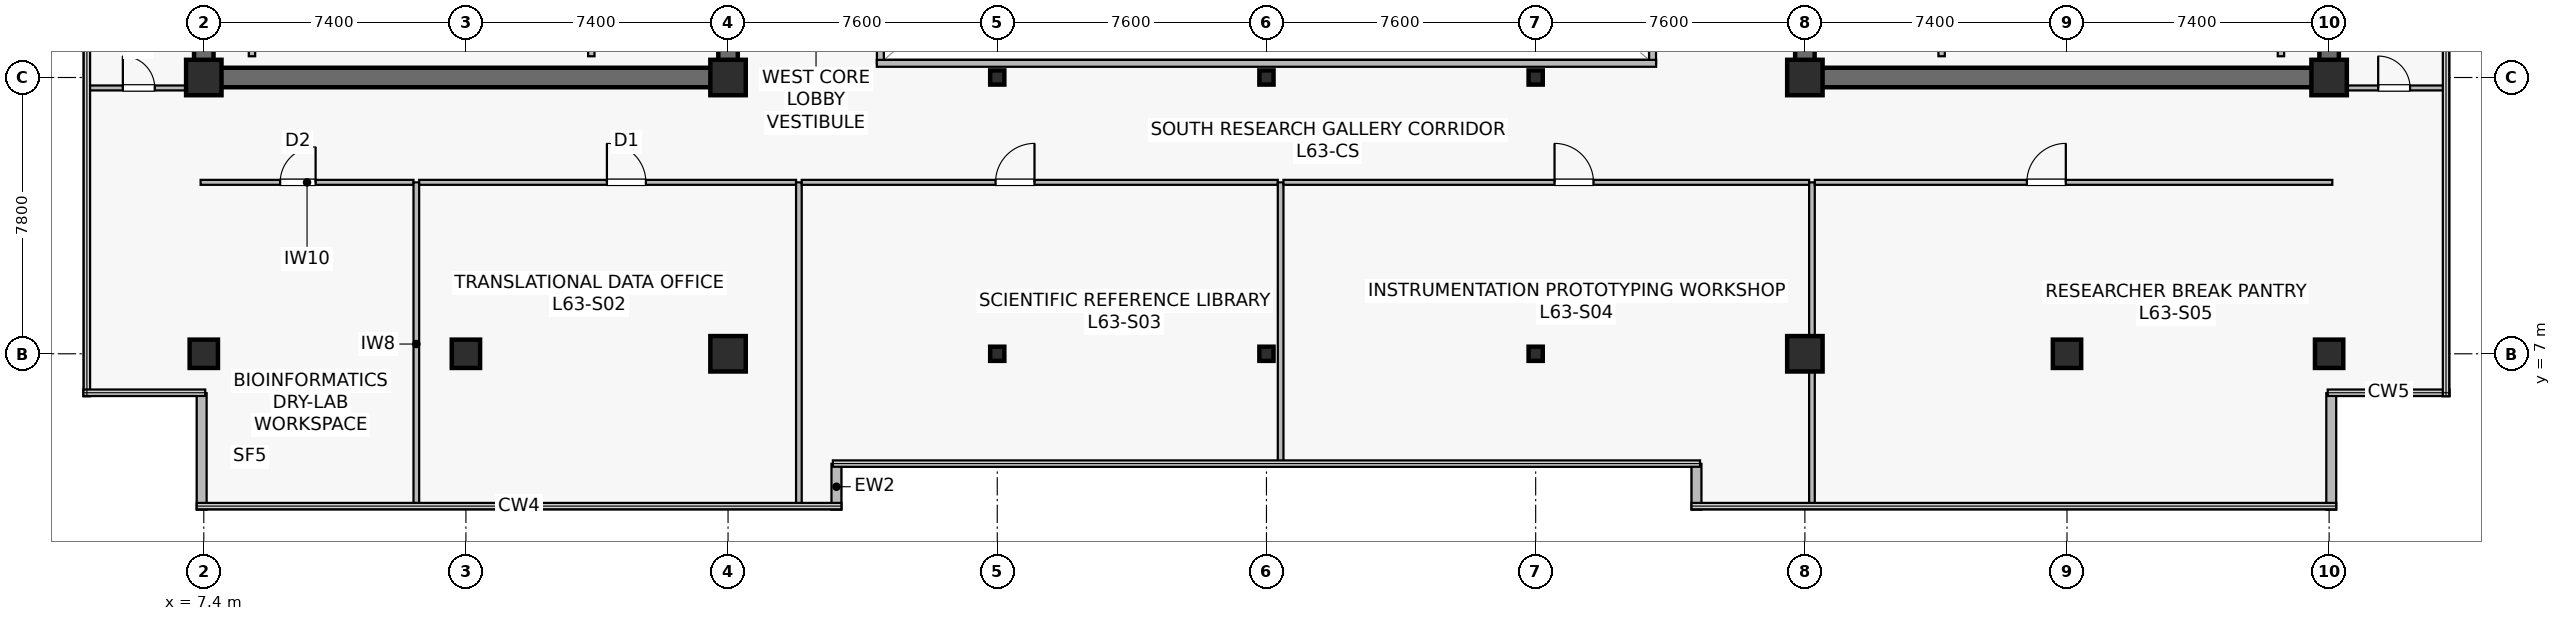
"""IFC4 building model, lengths in metres.
Left out: names, types, materials, properties, quantities, classifications, styles, units other than length and angle.
Written with IfcOpenShell. Run it as: python <this file> out.ifc"""

import sys

from ifc_helpers import new_model, si_unit, direction, frame, frame_2d, origin, origin_2d, place, context, subcontext, project, spatial, rectangle, hollow_rectangle, extrude, source, transform, mapped, element, fill, save


model = new_model("IFC4")
c1 = context("Model", 3, precision=1e-05, world=origin(), true_north=direction((0.0, 1.0)))
c2 = subcontext(c1, "Body", "Model", "MODEL_VIEW")
j1 = project(units=[si_unit("LENGTHUNIT", "METRE"), si_unit("PLANEANGLEUNIT", "RADIAN")], contexts=[c1])
p1 = place(None, origin())
s1 = spatial("IfcSite", under=j1, at=p1, CompositionType="ELEMENT")
p2 = place(p1, origin())
s2 = spatial("IfcBuilding", under=s1, at=p2, CompositionType="ELEMENT")
p3 = place(p2, frame((0.0, 0.0, 262.9)))
s3 = spatial("IfcBuildingStorey", under=s2, at=p3, CompositionType="ELEMENT", Elevation=262.9)
p4 = place(p3, frame((7.125, 14.8, 0.0), z_axis=(0.0, 0.0, 1.0), x_axis=(1.0, 0.0, 0.0)))
e1 = element("IfcWall", 1, at=p4, inside=s3, PredefinedType="SHEAR", context=c2, shape_type="SweptSolid", body=[
    extrude(rectangle(XDim=15.35, YDim=0.55, at=frame_2d((7.675, 0.0))), origin(), (0.0, 0.0, 1.0), 3.8),
])
p5 = place(p3, frame((7.4, 15.075, 0.0), z_axis=(0.0, 0.0, 1.0), x_axis=(0.0, 1.0, 0.0)))
e2 = element("IfcWall", 2, at=p5, inside=s3, PredefinedType="SHEAR", context=c2, shape_type="SweptSolid", body=[
    extrude(rectangle(XDim=18.45, YDim=0.55, at=frame_2d((9.225, 0.0))), origin(), (0.0, 0.0, 1.0), 3.8),
])
p6 = place(p3, frame((22.2, 15.075, 0.0), z_axis=(0.0, 0.0, 1.0), x_axis=(0.0, 1.0, 0.0)))
e3 = element("IfcWall", 3, at=p6, inside=s3, PredefinedType="SHEAR", context=c2, shape_type="SweptSolid", body=[
    extrude(rectangle(XDim=18.45, YDim=0.55, at=frame_2d((9.225, 0.0))), origin(), (0.0, 0.0, 1.0), 3.8),
])
p7 = place(p6, frame((3.475, 0.0, 0.0)))
e4 = element("IfcOpeningElement", 4, at=p7, cuts=e3, PredefinedType="OPENING", context=c2, shape_type="SweptSolid", body=[
    extrude(rectangle(XDim=1.42, YDim=2.2, at=frame_2d((0.71, 1.1))), frame((0.0, 0.285, 0.0), z_axis=(0.0, -1.0, 0.0), x_axis=(1.0, 0.0, 0.0)), (0.0, 0.0, 1.0), 0.57),
])
p8 = place(p3, frame((52.325, 14.8, 0.0), z_axis=(0.0, 0.0, 1.0), x_axis=(1.0, 0.0, 0.0)))
e5 = element("IfcWall", 5, at=p8, inside=s3, PredefinedType="SHEAR", context=c2, shape_type="SweptSolid", body=[
    extrude(rectangle(XDim=15.35, YDim=0.55, at=frame_2d((7.675, 0.0))), origin(), (0.0, 0.0, 1.0), 3.8),
])
p9 = place(p3, frame((52.6, 15.075, 0.0), z_axis=(0.0, 0.0, 1.0), x_axis=(0.0, 1.0, 0.0)))
e6 = element("IfcWall", 6, at=p9, inside=s3, PredefinedType="SHEAR", context=c2, shape_type="SweptSolid", body=[
    extrude(rectangle(XDim=18.45, YDim=0.55, at=frame_2d((9.225, 0.0))), origin(), (0.0, 0.0, 1.0), 3.8),
])
p10 = place(p9, frame((3.475, 0.0, 0.0)))
e7 = element("IfcOpeningElement", 7, at=p10, cuts=e6, PredefinedType="OPENING", context=c2, shape_type="SweptSolid", body=[
    extrude(rectangle(XDim=1.42, YDim=2.2, at=frame_2d((0.71, 1.1))), frame((0.0, 0.285, 0.0), z_axis=(0.0, -1.0, 0.0), x_axis=(1.0, 0.0, 0.0)), (0.0, 0.0, 1.0), 0.57),
])
p11 = place(p3, frame((67.4, 15.075, 0.0), z_axis=(0.0, 0.0, 1.0), x_axis=(0.0, 1.0, 0.0)))
e8 = element("IfcWall", 8, at=p11, inside=s3, PredefinedType="SHEAR", context=c2, shape_type="SweptSolid", body=[
    extrude(rectangle(XDim=18.45, YDim=0.55, at=frame_2d((9.225, 0.0))), origin(), (0.0, 0.0, 1.0), 3.8),
])
m1 = source(origin(), c2, "Body", "SweptSolid", [
    extrude(rectangle(XDim=0.8, YDim=0.8, at=origin_2d()), origin(), (0.0, 0.0, 1.0), 4.1),
])
p12 = place(p3, frame((14.8, 7.0, 0.0), z_axis=(0.0, 0.0, 1.0), x_axis=(1.0, 0.0, 0.0)))
e9 = element("IfcColumn", 9, at=p12, inside=s3, PredefinedType="COLUMN", context=c2, shape_type="MappedRepresentation", body=[
    mapped(m1, transform((0.0, 0.0, 0.0), scale=1.0)),
])
m2 = source(origin(), c2, "Body", "SweptSolid", [
    extrude(rectangle(XDim=1.0, YDim=1.0, at=origin_2d()), origin(), (0.0, 0.0, 1.0), 4.1),
])
for number, where, z_axis, x_axis in (
    (10, (22.2, 7.0, 0.0), (0.0, 0.0, 1.0), (1.0, 0.0, 0.0)),
    (11, (7.4, 14.8, 0.0), (0.0, 0.0, 1.0), (1.0, 0.0, 0.0)),
    (12, (22.2, 14.8, 0.0), (0.0, 0.0, 1.0), (1.0, 0.0, 0.0)),
    (13, (52.6, 7.0, 0.0), (0.0, 0.0, 1.0), (1.0, 0.0, 0.0)),
):
    element("IfcColumn", number, at=place(p3, frame(where, z_axis=z_axis, x_axis=x_axis)), inside=s3, PredefinedType="COLUMN", context=c2, shape_type="MappedRepresentation", body=[
        mapped(m2, transform((0.0, 0.0, 0.0), scale=1.0)),
    ])
p13 = place(p3, frame((60.0, 7.0, 0.0), z_axis=(0.0, 0.0, 1.0), x_axis=(1.0, 0.0, 0.0)))
e14 = element("IfcColumn", 14, at=p13, inside=s3, PredefinedType="COLUMN", context=c2, shape_type="MappedRepresentation", body=[
    mapped(m1, transform((0.0, 0.0, 0.0), scale=1.0)),
])
for number, where, z_axis, x_axis in (
    (15, (52.6, 14.8, 0.0), (0.0, 0.0, 1.0), (1.0, 0.0, 0.0)),
    (16, (67.4, 14.8, 0.0), (0.0, 0.0, 1.0), (1.0, 0.0, 0.0)),
):
    element("IfcColumn", number, at=place(p3, frame(where, z_axis=z_axis, x_axis=x_axis)), inside=s3, PredefinedType="COLUMN", context=c2, shape_type="MappedRepresentation", body=[
        mapped(m2, transform((0.0, 0.0, 0.0), scale=1.0)),
    ])
for number, where, z_axis, x_axis in (
    (17, (7.4, 7.0, 0.0), (0.0, 0.0, 1.0), (1.0, 0.0, 0.0)),
    (18, (67.4, 7.0, 0.0), (0.0, 0.0, 1.0), (1.0, 0.0, 0.0)),
):
    element("IfcColumn", number, at=place(p3, frame(where, z_axis=z_axis, x_axis=x_axis)), inside=s3, PredefinedType="COLUMN", context=c2, shape_type="MappedRepresentation", body=[
        mapped(m1, transform((0.0, 0.0, 0.0), scale=1.0)),
    ])
m3 = source(origin(), c2, "Body", "SweptSolid", [
    extrude(hollow_rectangle(XDim=0.4, YDim=0.4, WallThickness=0.019, at=origin_2d()), origin(), (0.0, 0.0, 1.0), 4.1),
])
for number, where, z_axis, x_axis in (
    (19, (29.8, 7.0, 0.0), (0.0, 0.0, 1.0), (1.0, 0.0, 0.0)),
    (20, (29.8, 14.8, 0.0), (0.0, 0.0, 1.0), (1.0, 0.0, 0.0)),
    (21, (37.4, 7.0, 0.0), (0.0, 0.0, 1.0), (1.0, 0.0, 0.0)),
    (22, (37.4, 14.8, 0.0), (0.0, 0.0, 1.0), (1.0, 0.0, 0.0)),
    (23, (45.0, 7.0, 0.0), (0.0, 0.0, 1.0), (1.0, 0.0, 0.0)),
    (24, (45.0, 14.8, 0.0), (0.0, 0.0, 1.0), (1.0, 0.0, 0.0)),
):
    element("IfcColumn", number, at=place(p3, frame(where, z_axis=z_axis, x_axis=x_axis)), inside=s3, PredefinedType="COLUMN", context=c2, shape_type="MappedRepresentation", body=[
        mapped(m3, transform((0.0, 0.0, 0.0), scale=1.0)),
    ])
for number, where, z_axis, x_axis in (
    (25, (25.26, 2.6, 0.0), (0.0, 0.0, 1.0), (0.0, 1.0, 0.0)),
    (26, (49.54, 3.893, 0.0), (0.0, 0.0, 1.0), (0.0, -1.0, 0.0)),
):
    element("IfcWall", number, at=place(p3, frame(where, z_axis=z_axis, x_axis=x_axis)), inside=s3, PredefinedType="STANDARD", context=c2, shape_type="SweptSolid", body=[
        extrude(rectangle(XDim=1.293, YDim=0.28, at=frame_2d((0.646, 0.0))), origin(), (0.0, 0.0, 1.0), 3.8),
    ])
for number, where, z_axis, x_axis in (
    (27, (67.46, 2.6, 0.0), (0.0, 0.0, 1.0), (0.0, 1.0, 0.0)),
    (28, (7.34, 5.888, 0.0), (0.0, 0.0, 1.0), (0.0, -1.0, 0.0)),
):
    element("IfcWall", number, at=place(p3, frame(where, z_axis=z_axis, x_axis=x_axis)), inside=s3, PredefinedType="STANDARD", context=c2, shape_type="SweptSolid", body=[
        extrude(rectangle(XDim=3.288, YDim=0.28, at=frame_2d((1.644, 0.0))), origin(), (0.0, 0.0, 1.0), 3.8),
    ])
for number, where, z_axis, x_axis in (
    (29, (18.34, 15.4, 0.0), (0.0, 0.0, 1.0), (0.0, 1.0, 0.0)),
    (30, (8.76, 15.4, 0.0), (0.0, 0.0, 1.0), (0.0, 1.0, 0.0)),
    (31, (56.46, 15.4, 0.0), (0.0, 0.0, 1.0), (0.0, 1.0, 0.0)),
    (32, (66.04, 15.4, 0.0), (0.0, 0.0, 1.0), (0.0, 1.0, 0.0)),
):
    element("IfcWall", number, at=place(p3, frame(where, z_axis=z_axis, x_axis=x_axis)), inside=s3, PredefinedType="SOLIDWALL", context=c2, shape_type="SweptSolid", body=[
        extrude(rectangle(XDim=2.4, YDim=0.18, at=frame_2d((1.2, 0.0))), origin(), (0.0, 0.0, 1.0), 3.8),
    ])
p14 = place(p3, frame((26.5, 15.2, 0.0), z_axis=(0.0, 0.0, 1.0), x_axis=(0.0, 1.0, 0.0)))
e33 = element("IfcWall", 33, at=p14, inside=s3, PredefinedType="SOLIDWALL", context=c2, shape_type="SweptSolid", body=[
    extrude(rectangle(XDim=18.2, YDim=0.195, at=frame_2d((9.1, 0.0))), origin(), (0.0, 0.0, 1.0), 3.8),
])
p15 = place(p14, frame((1.8, 0.0, 0.9)))
e34 = element("IfcOpeningElement", 34, at=p15, cuts=e33, PredefinedType="OPENING", context=c2, shape_type="SweptSolid", body=[
    extrude(rectangle(XDim=1.2, YDim=1.35, at=frame_2d((0.6, 0.675))), frame((0.0, 0.107, 0.0), z_axis=(0.0, -1.0, 0.0), x_axis=(1.0, 0.0, 0.0)), (0.0, 0.0, 1.0), 0.215),
])
p16 = place(p14, frame((13.2, 0.0, 0.9)))
e35 = element("IfcOpeningElement", 35, at=p16, cuts=e33, PredefinedType="OPENING", context=c2, shape_type="SweptSolid", body=[
    extrude(rectangle(XDim=1.2, YDim=1.35, at=frame_2d((0.6, 0.675))), frame((0.0, 0.107, 0.0), z_axis=(0.0, -1.0, 0.0), x_axis=(1.0, 0.0, 0.0)), (0.0, 0.0, 1.0), 0.215),
])
p17 = place(p3, frame((48.3, 15.2, 0.0), z_axis=(0.0, 0.0, 1.0), x_axis=(0.0, 1.0, 0.0)))
e36 = element("IfcWall", 36, at=p17, inside=s3, PredefinedType="SOLIDWALL", context=c2, shape_type="SweptSolid", body=[
    extrude(rectangle(XDim=18.2, YDim=0.195, at=frame_2d((9.1, 0.0))), origin(), (0.0, 0.0, 1.0), 3.8),
])
p18 = place(p17, frame((1.8, 0.0, 0.9)))
e37 = element("IfcOpeningElement", 37, at=p18, cuts=e36, PredefinedType="OPENING", context=c2, shape_type="SweptSolid", body=[
    extrude(rectangle(XDim=1.2, YDim=1.35, at=frame_2d((0.6, 0.675))), frame((0.0, 0.107, 0.0), z_axis=(0.0, -1.0, 0.0), x_axis=(1.0, 0.0, 0.0)), (0.0, 0.0, 1.0), 0.215),
])
p19 = place(p17, frame((13.2, 0.0, 0.9)))
e38 = element("IfcOpeningElement", 38, at=p19, cuts=e36, PredefinedType="OPENING", context=c2, shape_type="SweptSolid", body=[
    extrude(rectangle(XDim=1.2, YDim=1.35, at=frame_2d((0.6, 0.675))), frame((0.0, 0.107, 0.0), z_axis=(0.0, -1.0, 0.0), x_axis=(1.0, 0.0, 0.0)), (0.0, 0.0, 1.0), 0.215),
])
p20 = place(p3, frame((26.4, 15.2, 0.0), z_axis=(0.0, 0.0, 1.0), x_axis=(1.0, 0.0, 0.0)))
e39 = element("IfcWall", 39, at=p20, inside=s3, PredefinedType="SOLIDWALL", context=c2, shape_type="SweptSolid", body=[
    extrude(rectangle(XDim=22.0, YDim=0.195, at=frame_2d((11.0, 0.0))), origin(), (0.0, 0.0, 1.0), 3.8),
])
p21 = place(p3, frame((7.31, 11.84, 0.0), z_axis=(0.0, 0.0, 1.0), x_axis=(1.0, 0.0, 0.0)))
e40 = element("IfcWall", 40, at=p21, inside=s3, PredefinedType="PARTITIONING", context=c2, shape_type="SweptSolid", body=[
    extrude(rectangle(XDim=6.01, YDim=0.14, at=frame_2d((3.005, 0.0))), origin(), (0.0, 0.0, 1.0), 3.335),
])
p22 = place(p21, frame((2.246, 0.0, 0.0)))
e41 = element("IfcOpeningElement", 41, at=p22, cuts=e40, PredefinedType="OPENING", context=c2, shape_type="SweptSolid", body=[
    extrude(rectangle(XDim=1.0, YDim=2.15, at=frame_2d((0.5, 1.075))), frame((0.0, 0.08, 0.0), z_axis=(0.0, -1.0, 0.0), x_axis=(1.0, 0.0, 0.0)), (0.0, 0.0, 1.0), 0.16),
])
p23 = place(p3, frame((13.4, 2.71, 0.0), z_axis=(0.0, 0.0, 1.0), x_axis=(0.0, 1.0, 0.0)))
e42 = element("IfcWall", 42, at=p23, inside=s3, PredefinedType="PARTITIONING", context=c2, shape_type="SweptSolid", body=[
    extrude(rectangle(XDim=9.13, YDim=0.16, at=frame_2d((4.565, 0.0))), origin(), (0.0, 0.0, 1.0), 3.135),
])
p24 = place(p3, frame((13.48, 11.84, 0.0), z_axis=(0.0, 0.0, 1.0), x_axis=(1.0, 0.0, 0.0)))
e43 = element("IfcWall", 43, at=p24, inside=s3, PredefinedType="PARTITIONING", context=c2, shape_type="SweptSolid", body=[
    extrude(rectangle(XDim=10.64, YDim=0.14, at=frame_2d((5.32, 0.0))), origin(), (0.0, 0.0, 1.0), 3.197),
])
p25 = place(p24, frame((5.3, 0.0, 0.0)))
e44 = element("IfcOpeningElement", 44, at=p25, cuts=e43, PredefinedType="OPENING", context=c2, shape_type="SweptSolid", body=[
    extrude(rectangle(XDim=1.1, YDim=2.18, at=frame_2d((0.55, 1.09))), frame((0.0, 0.08, 0.0), z_axis=(0.0, -1.0, 0.0), x_axis=(1.0, 0.0, 0.0)), (0.0, 0.0, 1.0), 0.16),
])
p26 = place(p3, frame((24.2, 2.71, 0.0), z_axis=(0.0, 0.0, 1.0), x_axis=(0.0, 1.0, 0.0)))
e45 = element("IfcWall", 45, at=p26, inside=s3, PredefinedType="PARTITIONING", context=c2, shape_type="SweptSolid", body=[
    extrude(rectangle(XDim=9.13, YDim=0.16, at=frame_2d((4.565, 0.0))), origin(), (0.0, 0.0, 1.0), 3.135),
])
p27 = place(p3, frame((24.28, 11.84, 0.0), z_axis=(0.0, 0.0, 1.0), x_axis=(1.0, 0.0, 0.0)))
e46 = element("IfcWall", 46, at=p27, inside=s3, PredefinedType="PARTITIONING", context=c2, shape_type="SweptSolid", body=[
    extrude(rectangle(XDim=13.44, YDim=0.14, at=frame_2d((6.72, 0.0))), origin(), (0.0, 0.0, 1.0), 3.197),
])
p28 = place(p27, frame((5.472, 0.0, 0.0)))
e47 = element("IfcOpeningElement", 47, at=p28, cuts=e46, PredefinedType="OPENING", context=c2, shape_type="SweptSolid", body=[
    extrude(rectangle(XDim=1.1, YDim=2.18, at=frame_2d((0.55, 1.09))), frame((0.0, 0.08, 0.0), z_axis=(0.0, -1.0, 0.0), x_axis=(1.0, 0.0, 0.0)), (0.0, 0.0, 1.0), 0.16),
])
p29 = place(p3, frame((37.8, 3.91, 0.0), z_axis=(0.0, 0.0, 1.0), x_axis=(0.0, 1.0, 0.0)))
e48 = element("IfcWall", 48, at=p29, inside=s3, PredefinedType="PARTITIONING", context=c2, shape_type="SweptSolid", body=[
    extrude(rectangle(XDim=7.93, YDim=0.16, at=frame_2d((3.965, 0.0))), origin(), (0.0, 0.0, 1.0), 3.135),
])
p30 = place(p3, frame((37.88, 11.84, 0.0), z_axis=(0.0, 0.0, 1.0), x_axis=(1.0, 0.0, 0.0)))
e49 = element("IfcWall", 49, at=p30, inside=s3, PredefinedType="PARTITIONING", context=c2, shape_type="SweptSolid", body=[
    extrude(rectangle(XDim=14.84, YDim=0.14, at=frame_2d((7.42, 0.0))), origin(), (0.0, 0.0, 1.0), 3.197),
])
p31 = place(p30, frame((7.652, 0.0, 0.0)))
e50 = element("IfcOpeningElement", 50, at=p31, cuts=e49, PredefinedType="OPENING", context=c2, shape_type="SweptSolid", body=[
    extrude(rectangle(XDim=1.1, YDim=2.18, at=frame_2d((0.55, 1.09))), frame((0.0, 0.08, 0.0), z_axis=(0.0, -1.0, 0.0), x_axis=(1.0, 0.0, 0.0)), (0.0, 0.0, 1.0), 0.16),
])
p32 = place(p3, frame((52.8, 2.71, 0.0), z_axis=(0.0, 0.0, 1.0), x_axis=(0.0, 1.0, 0.0)))
e51 = element("IfcWall", 51, at=p32, inside=s3, PredefinedType="PARTITIONING", context=c2, shape_type="SweptSolid", body=[
    extrude(rectangle(XDim=9.13, YDim=0.16, at=frame_2d((4.565, 0.0))), origin(), (0.0, 0.0, 1.0), 3.135),
])
p33 = place(p3, frame((52.88, 11.84, 0.0), z_axis=(0.0, 0.0, 1.0), x_axis=(1.0, 0.0, 0.0)))
e52 = element("IfcWall", 52, at=p33, inside=s3, PredefinedType="PARTITIONING", context=c2, shape_type="SweptSolid", body=[
    extrude(rectangle(XDim=14.61, YDim=0.14, at=frame_2d((7.305, 0.0))), origin(), (0.0, 0.0, 1.0), 3.197),
])
p34 = place(p33, frame((5.986, 0.0, 0.0)))
e53 = element("IfcOpeningElement", 53, at=p34, cuts=e52, PredefinedType="OPENING", context=c2, shape_type="SweptSolid", body=[
    extrude(rectangle(XDim=1.1, YDim=2.18, at=frame_2d((0.55, 1.09))), frame((0.0, 0.08, 0.0), z_axis=(0.0, -1.0, 0.0), x_axis=(1.0, 0.0, 0.0)), (0.0, 0.0, 1.0), 0.16),
])
p35 = place(p3, frame((4.11, 14.505, 0.0), z_axis=(0.0, 0.0, 1.0), x_axis=(1.0, 0.0, 0.0)))
e54 = element("IfcWall", 54, at=p35, inside=s3, PredefinedType="PARTITIONING", context=c2, shape_type="SweptSolid", body=[
    extrude(rectangle(XDim=2.91, YDim=0.14, at=frame_2d((1.455, 0.0))), origin(), (0.0, 0.0, 1.0), 3.8),
])
p36 = place(p35, frame((1.005, 0.0, 0.0)))
e55 = element("IfcOpeningElement", 55, at=p36, cuts=e54, PredefinedType="OPENING", context=c2, shape_type="SweptSolid", body=[
    extrude(rectangle(XDim=0.9, YDim=2.1, at=frame_2d((0.45, 1.05))), frame((0.0, 0.08, 0.0), z_axis=(0.0, -1.0, 0.0), x_axis=(1.0, 0.0, 0.0)), (0.0, 0.0, 1.0), 0.16),
])
p37 = place(p3, frame((67.78, 14.505, 0.0), z_axis=(0.0, 0.0, 1.0), x_axis=(1.0, 0.0, 0.0)))
e56 = element("IfcWall", 56, at=p37, inside=s3, PredefinedType="PARTITIONING", context=c2, shape_type="SweptSolid", body=[
    extrude(rectangle(XDim=2.91, YDim=0.14, at=frame_2d((1.455, 0.0))), origin(), (0.0, 0.0, 1.0), 3.8),
])
p38 = place(p37, frame((1.005, 0.0, 0.0)))
e57 = element("IfcOpeningElement", 57, at=p38, cuts=e56, PredefinedType="OPENING", context=c2, shape_type="SweptSolid", body=[
    extrude(rectangle(XDim=0.9, YDim=2.1, at=frame_2d((0.45, 1.05))), frame((0.0, 0.08, 0.0), z_axis=(0.0, -1.0, 0.0), x_axis=(1.0, 0.0, 0.0)), (0.0, 0.0, 1.0), 0.16),
])
m4 = source(origin(), c2, "Body", "SweptSolid", [
    extrude(rectangle(XDim=1.0, YDim=2.15, at=frame_2d((0.5, 1.075))), frame((0.0, 0.025, 0.0), z_axis=(0.0, -1.0, 0.0), x_axis=(1.0, 0.0, 0.0)), (0.0, 0.0, 1.0), 0.05),
])
p39 = place(p22, origin())
e58 = element("IfcDoor", 58, at=p39, inside=s3, OperationType="SINGLE_SWING_RIGHT", PredefinedType="DOOR", context=c2, shape_type="MappedRepresentation", body=[
    mapped(m4, transform((0.0, 0.0, 0.0), scale=1.0)),
])
fill(e41, e58)
m5 = source(origin(), c2, "Body", "SweptSolid", [
    extrude(rectangle(XDim=1.1, YDim=2.18, at=frame_2d((0.55, 1.09))), frame((0.0, 0.025, 0.0), z_axis=(0.0, -1.0, 0.0), x_axis=(1.0, 0.0, 0.0)), (0.0, 0.0, 1.0), 0.05),
])
p40 = place(p25, origin())
e59 = element("IfcDoor", 59, at=p40, inside=s3, OperationType="SINGLE_SWING_LEFT", PredefinedType="DOOR", context=c2, shape_type="MappedRepresentation", body=[
    mapped(m5, transform((0.0, 0.0, 0.0), scale=1.0)),
])
fill(e44, e59)
p41 = place(p28, origin())
e60 = element("IfcDoor", 60, at=p41, inside=s3, OperationType="SINGLE_SWING_RIGHT", PredefinedType="DOOR", context=c2, shape_type="MappedRepresentation", body=[
    mapped(m5, transform((0.0, 0.0, 0.0), scale=1.0)),
])
fill(e47, e60)
p42 = place(p31, origin())
e61 = element("IfcDoor", 61, at=p42, inside=s3, OperationType="SINGLE_SWING_LEFT", PredefinedType="DOOR", context=c2, shape_type="MappedRepresentation", body=[
    mapped(m5, transform((0.0, 0.0, 0.0), scale=1.0)),
])
fill(e50, e61)
p43 = place(p34, origin())
e62 = element("IfcDoor", 62, at=p43, inside=s3, OperationType="SINGLE_SWING_RIGHT", PredefinedType="DOOR", context=c2, shape_type="MappedRepresentation", body=[
    mapped(m5, transform((0.0, 0.0, 0.0), scale=1.0)),
])
fill(e53, e62)
m6 = source(origin(), c2, "Body", "SweptSolid", [
    extrude(rectangle(XDim=0.9, YDim=2.1, at=frame_2d((0.45, 1.05))), frame((0.0, 0.025, 0.0), z_axis=(0.0, -1.0, 0.0), x_axis=(1.0, 0.0, 0.0)), (0.0, 0.0, 1.0), 0.05),
])
p44 = place(p36, origin())
e63 = element("IfcDoor", 63, at=p44, inside=s3, OperationType="SINGLE_SWING_LEFT", PredefinedType="DOOR", context=c2, shape_type="MappedRepresentation", body=[
    mapped(m6, transform((0.0, 0.0, 0.0), scale=1.0)),
])
fill(e55, e63)
p45 = place(p38, origin())
e64 = element("IfcDoor", 64, at=p45, inside=s3, OperationType="SINGLE_SWING_LEFT", PredefinedType="DOOR", context=c2, shape_type="MappedRepresentation", body=[
    mapped(m6, transform((0.0, 0.0, 0.0), scale=1.0)),
])
fill(e57, e64)
save(model, sys.argv[1])
